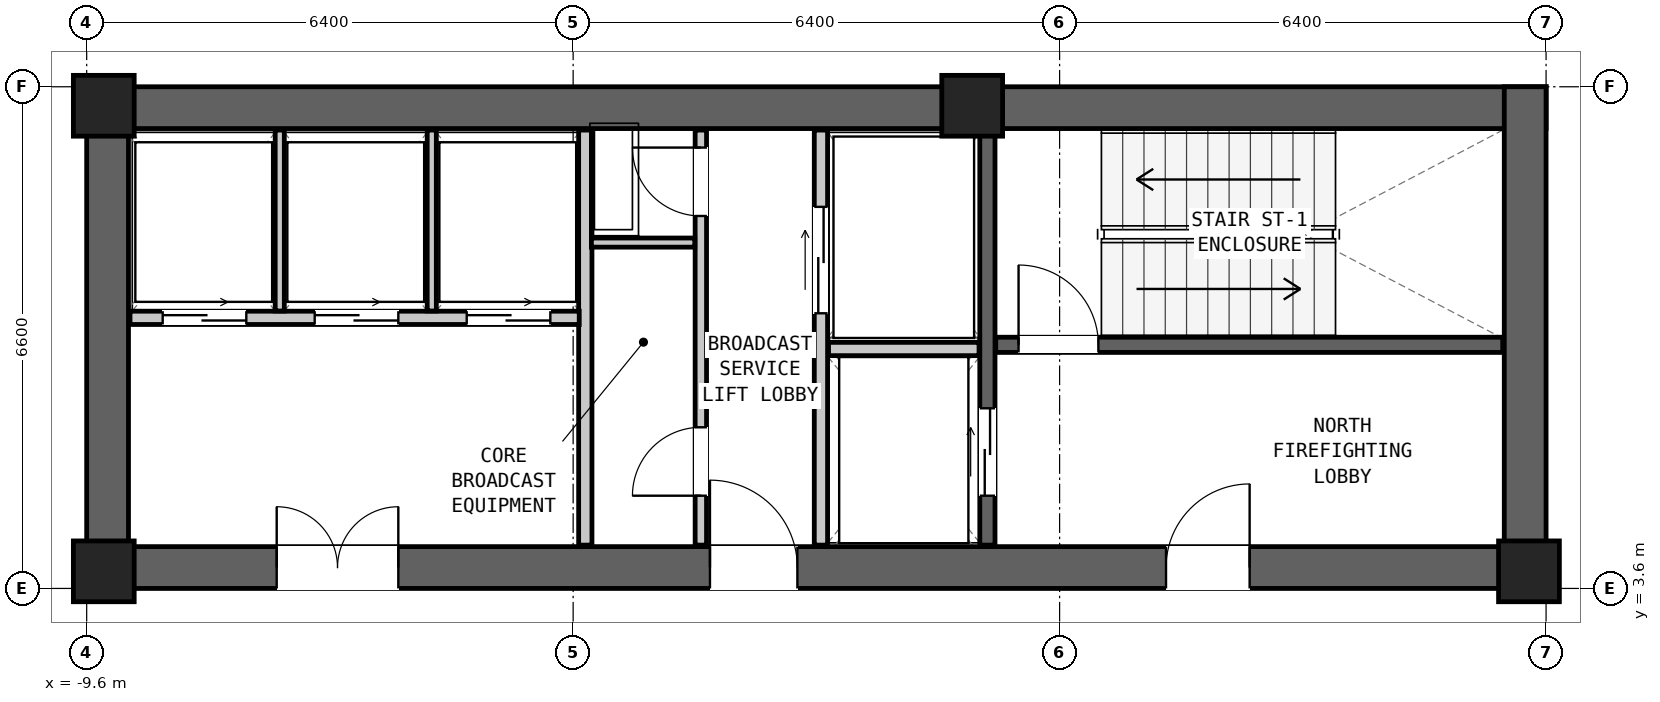
"""IFC4 building model, lengths in metres.
Left out: names, types, materials, properties, quantities, classifications, styles, units other than length and angle.
Written with IfcOpenShell. Run it as: python <this file> out.ifc"""

import sys

from ifc_helpers import new_model, si_unit, direction, frame, frame_2d, origin, origin_2d, place, context, subcontext, project, spatial, rectangle, extrude, element, fill, save


model = new_model("IFC4")
c1 = context("Model", 3, precision=1e-05, world=origin(), true_north=direction((0.0, 1.0)))
c2 = subcontext(c1, "Body", "Model", "MODEL_VIEW")
j1 = project(units=[si_unit("LENGTHUNIT", "METRE"), si_unit("PLANEANGLEUNIT", "RADIAN")], contexts=[c1])
p1 = place(None, origin())
s1 = spatial("IfcSite", under=j1, at=p1, CompositionType="ELEMENT")
p2 = place(p1, origin())
s2 = spatial("IfcBuilding", under=s1, at=p2, CompositionType="ELEMENT")
p3 = place(p2, frame((0.0, 0.0, 96.9)))
s3 = spatial("IfcBuildingStorey", under=s2, at=p3, CompositionType="ELEMENT", Elevation=96.9)
p4 = place(p3, frame((-9.6, 9.925, 0.0), z_axis=(0.0, 0.0, 1.0), x_axis=(1.0, 0.0, 0.0)))
e1 = element("IfcWall", 1, at=p4, inside=s3, PredefinedType="SHEAR", context=c2, shape_type="SweptSolid", body=[
    extrude(rectangle(XDim=19.2, YDim=0.55, at=frame_2d((9.6, 0.0))), origin(), (0.0, 0.0, 1.0), 4.35),
])
p5 = place(p3, frame((-9.6, 3.875, 0.0), z_axis=(0.0, 0.0, 1.0), x_axis=(1.0, 0.0, 0.0)))
e2 = element("IfcWall", 2, at=p5, inside=s3, PredefinedType="SHEAR", context=c2, shape_type="SweptSolid", body=[
    extrude(rectangle(XDim=19.2, YDim=0.55, at=frame_2d((9.6, 0.0))), origin(), (0.0, 0.0, 1.0), 4.35),
])
p6 = place(p5, frame((14.2, 0.0, 0.0)))
e3 = element("IfcOpeningElement", 3, at=p6, cuts=e2, PredefinedType="OPENING", context=c2, shape_type="SweptSolid", body=[
    extrude(rectangle(XDim=1.1, YDim=2.08, at=frame_2d((0.55, 1.04))), frame((0.0, 0.287, 0.0), z_axis=(0.0, -1.0, 0.0), x_axis=(1.0, 0.0, 0.0)), (0.0, 0.0, 1.0), 0.574),
])
p7 = place(p5, frame((8.2, 0.0, 0.0)))
e4 = element("IfcOpeningElement", 4, at=p7, cuts=e2, PredefinedType="OPENING", context=c2, shape_type="SweptSolid", body=[
    extrude(rectangle(XDim=1.15, YDim=2.1, at=frame_2d((0.575, 1.05))), frame((0.0, 0.287, 0.0), z_axis=(0.0, -1.0, 0.0), x_axis=(1.0, 0.0, 0.0)), (0.0, 0.0, 1.0), 0.574),
])
p8 = place(p5, frame((2.5, 0.0, 0.0)))
e5 = element("IfcOpeningElement", 5, at=p8, cuts=e2, PredefinedType="OPENING", context=c2, shape_type="SweptSolid", body=[
    extrude(rectangle(XDim=1.6, YDim=2.12, at=frame_2d((0.8, 1.06))), frame((0.0, 0.287, 0.0), z_axis=(0.0, -1.0, 0.0), x_axis=(1.0, 0.0, 0.0)), (0.0, 0.0, 1.0), 0.574),
])
for number, where, z_axis, x_axis in (
    (6, (-9.325, 3.6, 0.0), (0.0, 0.0, 1.0), (0.0, 1.0, 0.0)),
    (7, (9.325, 3.6, 0.0), (0.0, 0.0, 1.0), (0.0, 1.0, 0.0)),
):
    element("IfcWall", number, at=place(p3, frame(where, z_axis=z_axis, x_axis=x_axis)), inside=s3, PredefinedType="SHEAR", context=c2, shape_type="SweptSolid", body=[
        extrude(rectangle(XDim=6.6, YDim=0.55, at=frame_2d((3.3, 0.0))), origin(), (0.0, 0.0, 1.0), 4.35),
    ])
for number, where, z_axis, x_axis in (
    (8, (-9.375, 9.95, 0.0), (0.0, 0.0, 1.0), (1.0, 0.0, 0.0)),
    (9, (2.05, 9.95, 0.0), (0.0, 0.0, 1.0), (1.0, 0.0, 0.0)),
    (10, (-9.375, 3.825, 0.0), (0.0, 0.0, 1.0), (1.0, 0.0, 0.0)),
    (11, (9.375, 3.825, 0.0), (0.0, 0.0, 1.0), (1.0, 0.0, 0.0)),
):
    element("IfcColumn", number, at=place(p3, frame(where, z_axis=z_axis, x_axis=x_axis)), inside=s3, PredefinedType="COLUMN", context=c2, shape_type="SweptSolid", body=[
        extrude(rectangle(XDim=0.8, YDim=0.8, at=origin_2d()), origin(), (0.0, 0.0, 1.0), 4.35),
    ])
p9 = place(p3, frame((2.36, 6.805, 0.0), z_axis=(0.0, 0.0, 1.0), x_axis=(1.0, 0.0, 0.0)))
e12 = element("IfcWall", 12, at=p9, inside=s3, PredefinedType="SHEAR", context=c2, shape_type="SweptSolid", body=[
    extrude(rectangle(XDim=6.67, YDim=0.2, at=frame_2d((3.335, 0.0))), origin(), (0.0, 0.0, 1.0), 4.07),
])
p10 = place(p9, frame((0.3, 0.0, 0.0)))
e13 = element("IfcOpeningElement", 13, at=p10, cuts=e12, PredefinedType="OPENING", context=c2, shape_type="SweptSolid", body=[
    extrude(rectangle(XDim=1.05, YDim=2.08, at=frame_2d((0.525, 1.04))), frame((0.0, 0.112, 0.0), z_axis=(0.0, -1.0, 0.0), x_axis=(1.0, 0.0, 0.0)), (0.0, 0.0, 1.0), 0.224),
])
p11 = place(p3, frame((2.25, 4.17, 0.0), z_axis=(0.0, 0.0, 1.0), x_axis=(0.0, 1.0, 0.0)))
e14 = element("IfcWall", 14, at=p11, inside=s3, PredefinedType="SHEAR", context=c2, shape_type="SweptSolid", body=[
    extrude(rectangle(XDim=5.46, YDim=0.2, at=frame_2d((2.73, 0.0))), origin(), (0.0, 0.0, 1.0), 4.07),
])
p12 = place(p11, frame((0.65, 0.0, 0.0)))
e15 = element("IfcOpeningElement", 15, at=p12, cuts=e14, PredefinedType="OPENING", context=c2, shape_type="SweptSolid", body=[
    extrude(rectangle(XDim=1.15, YDim=2.08, at=frame_2d((0.575, 1.04))), frame((0.0, 0.112, 0.0), z_axis=(0.0, -1.0, 0.0), x_axis=(1.0, 0.0, 0.0)), (0.0, 0.0, 1.0), 0.224),
])
p13 = place(p3, frame((0.06, 4.17, 0.0), z_axis=(0.0, 0.0, 1.0), x_axis=(0.0, 1.0, 0.0)))
e16 = element("IfcWall", 16, at=p13, inside=s3, PredefinedType="PARTITIONING", context=c2, shape_type="SweptSolid", body=[
    extrude(rectangle(XDim=5.46, YDim=0.175, at=frame_2d((2.73, 0.0))), origin(), (0.0, 0.0, 1.0), 4.07),
])
p14 = place(p13, frame((3.05, 0.0, 0.0)))
e17 = element("IfcOpeningElement", 17, at=p14, cuts=e16, PredefinedType="OPENING", context=c2, shape_type="SweptSolid", body=[
    extrude(rectangle(XDim=1.4, YDim=2.12, at=frame_2d((0.7, 1.06))), frame((0.0, 0.1, 0.0), z_axis=(0.0, -1.0, 0.0), x_axis=(1.0, 0.0, 0.0)), (0.0, 0.0, 1.0), 0.199),
])
p15 = place(p3, frame((0.16, 6.75, 0.0), z_axis=(0.0, 0.0, 1.0), x_axis=(1.0, 0.0, 0.0)))
e18 = element("IfcWall", 18, at=p15, inside=s3, PredefinedType="PARTITIONING", context=c2, shape_type="SweptSolid", body=[
    extrude(rectangle(XDim=1.98, YDim=0.175, at=frame_2d((0.99, 0.0))), origin(), (0.0, 0.0, 1.0), 4.07),
])
p16 = place(p3, frame((-3.04, 4.17, 0.0), z_axis=(0.0, 0.0, 1.0), x_axis=(0.0, 1.0, 0.0)))
e19 = element("IfcWall", 19, at=p16, inside=s3, PredefinedType="PARTITIONING", context=c2, shape_type="SweptSolid", body=[
    extrude(rectangle(XDim=5.46, YDim=0.175, at=frame_2d((2.73, 0.0))), origin(), (0.0, 0.0, 1.0), 4.07),
])
p17 = place(p3, frame((-1.52, 4.17, 0.0), z_axis=(0.0, 0.0, 1.0), x_axis=(0.0, 1.0, 0.0)))
e20 = element("IfcWall", 20, at=p17, inside=s3, PredefinedType="PARTITIONING", context=c2, shape_type="SweptSolid", body=[
    extrude(rectangle(XDim=5.46, YDim=0.15, at=frame_2d((2.73, 0.0))), origin(), (0.0, 0.0, 1.0), 4.07),
])
p18 = place(p17, frame((4.33, 0.0, 0.0)))
e21 = element("IfcOpeningElement", 21, at=p18, cuts=e20, PredefinedType="OPENING", context=c2, shape_type="SweptSolid", body=[
    extrude(rectangle(XDim=0.9, YDim=2.05, at=frame_2d((0.45, 1.025))), frame((0.0, 0.087, 0.0), z_axis=(0.0, -1.0, 0.0), x_axis=(1.0, 0.0, 0.0)), (0.0, 0.0, 1.0), 0.174),
])
p19 = place(p17, frame((0.65, 0.0, 0.0)))
e22 = element("IfcOpeningElement", 22, at=p19, cuts=e20, PredefinedType="OPENING", context=c2, shape_type="SweptSolid", body=[
    extrude(rectangle(XDim=0.9, YDim=2.05, at=frame_2d((0.45, 1.025))), frame((0.0, 0.087, 0.0), z_axis=(0.0, -1.0, 0.0), x_axis=(1.0, 0.0, 0.0)), (0.0, 0.0, 1.0), 0.174),
])
p20 = place(p3, frame((-2.96, 8.15, 0.0), z_axis=(0.0, 0.0, 1.0), x_axis=(1.0, 0.0, 0.0)))
e23 = element("IfcWall", 23, at=p20, inside=s3, PredefinedType="PARTITIONING", context=c2, shape_type="SweptSolid", body=[
    extrude(rectangle(XDim=1.36, YDim=0.12, at=frame_2d((0.68, 0.0))), origin(), (0.0, 0.0, 1.0), 4.07),
])
p21 = place(p3, frame((-9.03, 7.16, 0.0), z_axis=(0.0, 0.0, 1.0), x_axis=(1.0, 0.0, 0.0)))
e24 = element("IfcWall", 24, at=p21, inside=s3, PredefinedType="PARTITIONING", context=c2, shape_type="SweptSolid", body=[
    extrude(rectangle(XDim=5.91, YDim=0.175, at=frame_2d((2.955, 0.0))), origin(), (0.0, 0.0, 1.0), 4.07),
])
p22 = place(p21, frame((0.43, 0.0, 0.0)))
e25 = element("IfcOpeningElement", 25, at=p22, cuts=e24, PredefinedType="OPENING", context=c2, shape_type="SweptSolid", body=[
    extrude(rectangle(XDim=1.1, YDim=2.06, at=frame_2d((0.55, 1.03))), frame((0.0, 0.1, 0.0), z_axis=(0.0, -1.0, 0.0), x_axis=(1.0, 0.0, 0.0)), (0.0, 0.0, 1.0), 0.199),
])
p23 = place(p21, frame((2.43, 0.0, 0.0)))
e26 = element("IfcOpeningElement", 26, at=p23, cuts=e24, PredefinedType="OPENING", context=c2, shape_type="SweptSolid", body=[
    extrude(rectangle(XDim=1.1, YDim=2.06, at=frame_2d((0.55, 1.03))), frame((0.0, 0.1, 0.0), z_axis=(0.0, -1.0, 0.0), x_axis=(1.0, 0.0, 0.0)), (0.0, 0.0, 1.0), 0.199),
])
p24 = place(p21, frame((4.43, 0.0, 0.0)))
e27 = element("IfcOpeningElement", 27, at=p24, cuts=e24, PredefinedType="OPENING", context=c2, shape_type="SweptSolid", body=[
    extrude(rectangle(XDim=1.1, YDim=2.06, at=frame_2d((0.55, 1.03))), frame((0.0, 0.1, 0.0), z_axis=(0.0, -1.0, 0.0), x_axis=(1.0, 0.0, 0.0)), (0.0, 0.0, 1.0), 0.199),
])
for number, where, z_axis, x_axis in (
    (28, (-7.06, 7.25, 0.0), (0.0, 0.0, 1.0), (0.0, 1.0, 0.0)),
    (29, (-5.06, 7.25, 0.0), (0.0, 0.0, 1.0), (0.0, 1.0, 0.0)),
):
    element("IfcWall", number, at=place(p3, frame(where, z_axis=z_axis, x_axis=x_axis)), inside=s3, PredefinedType="PARTITIONING", context=c2, shape_type="SweptSolid", body=[
        extrude(rectangle(XDim=2.38, YDim=0.12, at=frame_2d((1.19, 0.0))), origin(), (0.0, 0.0, 1.0), 4.07),
    ])
p25 = place(p10, origin())
e30 = element("IfcDoor", 30, at=p25, inside=s3, OperationType="SINGLE_SWING_LEFT", PredefinedType="DOOR", context=c2, shape_type="SweptSolid", body=[
    extrude(rectangle(XDim=1.05, YDim=2.08, at=frame_2d((0.525, 1.04))), frame((0.0, 0.025, 0.0), z_axis=(0.0, -1.0, 0.0), x_axis=(1.0, 0.0, 0.0)), (0.0, 0.0, 1.0), 0.05),
])
fill(e13, e30)
p26 = place(p6, origin())
e31 = element("IfcDoor", 31, at=p26, inside=s3, OperationType="SINGLE_SWING_RIGHT", PredefinedType="DOOR", context=c2, shape_type="SweptSolid", body=[
    extrude(rectangle(XDim=1.1, YDim=2.08, at=frame_2d((0.55, 1.04))), frame((0.0, 0.025, 0.0), z_axis=(0.0, -1.0, 0.0), x_axis=(1.0, 0.0, 0.0)), (0.0, 0.0, 1.0), 0.05),
])
fill(e3, e31)
p27 = place(p12, origin())
e32 = element("IfcDoor", 32, at=p27, inside=s3, OperationType="DOUBLE_DOOR_SLIDING", PredefinedType="DOOR", context=c2, shape_type="SweptSolid", body=[
    extrude(rectangle(XDim=1.15, YDim=2.08, at=frame_2d((0.575, 1.04))), frame((0.0, 0.025, 0.0), z_axis=(0.0, -1.0, 0.0), x_axis=(1.0, 0.0, 0.0)), (0.0, 0.0, 1.0), 0.05),
])
fill(e15, e32)
p28 = place(p14, origin())
e33 = element("IfcDoor", 33, at=p28, inside=s3, OperationType="DOUBLE_DOOR_SLIDING", PredefinedType="DOOR", context=c2, shape_type="SweptSolid", body=[
    extrude(rectangle(XDim=1.4, YDim=2.12, at=frame_2d((0.7, 1.06))), frame((0.0, 0.025, 0.0), z_axis=(0.0, -1.0, 0.0), x_axis=(1.0, 0.0, 0.0)), (0.0, 0.0, 1.0), 0.05),
])
fill(e17, e33)
p29 = place(p7, origin())
e34 = element("IfcDoor", 34, at=p29, inside=s3, OperationType="SINGLE_SWING_LEFT", PredefinedType="DOOR", context=c2, shape_type="SweptSolid", body=[
    extrude(rectangle(XDim=1.15, YDim=2.1, at=frame_2d((0.575, 1.05))), frame((0.0, 0.025, 0.0), z_axis=(0.0, -1.0, 0.0), x_axis=(1.0, 0.0, 0.0)), (0.0, 0.0, 1.0), 0.05),
])
fill(e4, e34)
p30 = place(p18, origin())
e35 = element("IfcDoor", 35, at=p30, inside=s3, OperationType="SINGLE_SWING_RIGHT", PredefinedType="DOOR", context=c2, shape_type="SweptSolid", body=[
    extrude(rectangle(XDim=0.9, YDim=2.05, at=frame_2d((0.45, 1.025))), frame((0.0, 0.025, 0.0), z_axis=(0.0, -1.0, 0.0), x_axis=(1.0, 0.0, 0.0)), (0.0, 0.0, 1.0), 0.05),
])
fill(e21, e35)
p31 = place(p19, origin())
e36 = element("IfcDoor", 36, at=p31, inside=s3, OperationType="SINGLE_SWING_LEFT", PredefinedType="DOOR", context=c2, shape_type="SweptSolid", body=[
    extrude(rectangle(XDim=0.9, YDim=2.05, at=frame_2d((0.45, 1.025))), frame((0.0, 0.025, 0.0), z_axis=(0.0, -1.0, 0.0), x_axis=(1.0, 0.0, 0.0)), (0.0, 0.0, 1.0), 0.05),
])
fill(e22, e36)
p32 = place(p22, origin())
e37 = element("IfcDoor", 37, at=p32, inside=s3, OperationType="DOUBLE_DOOR_SLIDING", PredefinedType="DOOR", context=c2, shape_type="SweptSolid", body=[
    extrude(rectangle(XDim=1.1, YDim=2.06, at=frame_2d((0.55, 1.03))), frame((0.0, 0.025, 0.0), z_axis=(0.0, -1.0, 0.0), x_axis=(1.0, 0.0, 0.0)), (0.0, 0.0, 1.0), 0.05),
])
fill(e25, e37)
p33 = place(p23, origin())
e38 = element("IfcDoor", 38, at=p33, inside=s3, OperationType="DOUBLE_DOOR_SLIDING", PredefinedType="DOOR", context=c2, shape_type="SweptSolid", body=[
    extrude(rectangle(XDim=1.1, YDim=2.06, at=frame_2d((0.55, 1.03))), frame((0.0, 0.025, 0.0), z_axis=(0.0, -1.0, 0.0), x_axis=(1.0, 0.0, 0.0)), (0.0, 0.0, 1.0), 0.05),
])
fill(e26, e38)
p34 = place(p24, origin())
e39 = element("IfcDoor", 39, at=p34, inside=s3, OperationType="DOUBLE_DOOR_SLIDING", PredefinedType="DOOR", context=c2, shape_type="SweptSolid", body=[
    extrude(rectangle(XDim=1.1, YDim=2.06, at=frame_2d((0.55, 1.03))), frame((0.0, 0.025, 0.0), z_axis=(0.0, -1.0, 0.0), x_axis=(1.0, 0.0, 0.0)), (0.0, 0.0, 1.0), 0.05),
])
fill(e27, e39)
p35 = place(p8, origin())
e40 = element("IfcDoor", 40, at=p35, inside=s3, OperationType="DOUBLE_DOOR_SINGLE_SWING", PredefinedType="DOOR", context=c2, shape_type="SweptSolid", body=[
    extrude(rectangle(XDim=1.6, YDim=2.12, at=frame_2d((0.8, 1.06))), frame((0.0, 0.025, 0.0), z_axis=(0.0, -1.0, 0.0), x_axis=(1.0, 0.0, 0.0)), (0.0, 0.0, 1.0), 0.05),
])
fill(e5, e40)
save(model, sys.argv[1])
